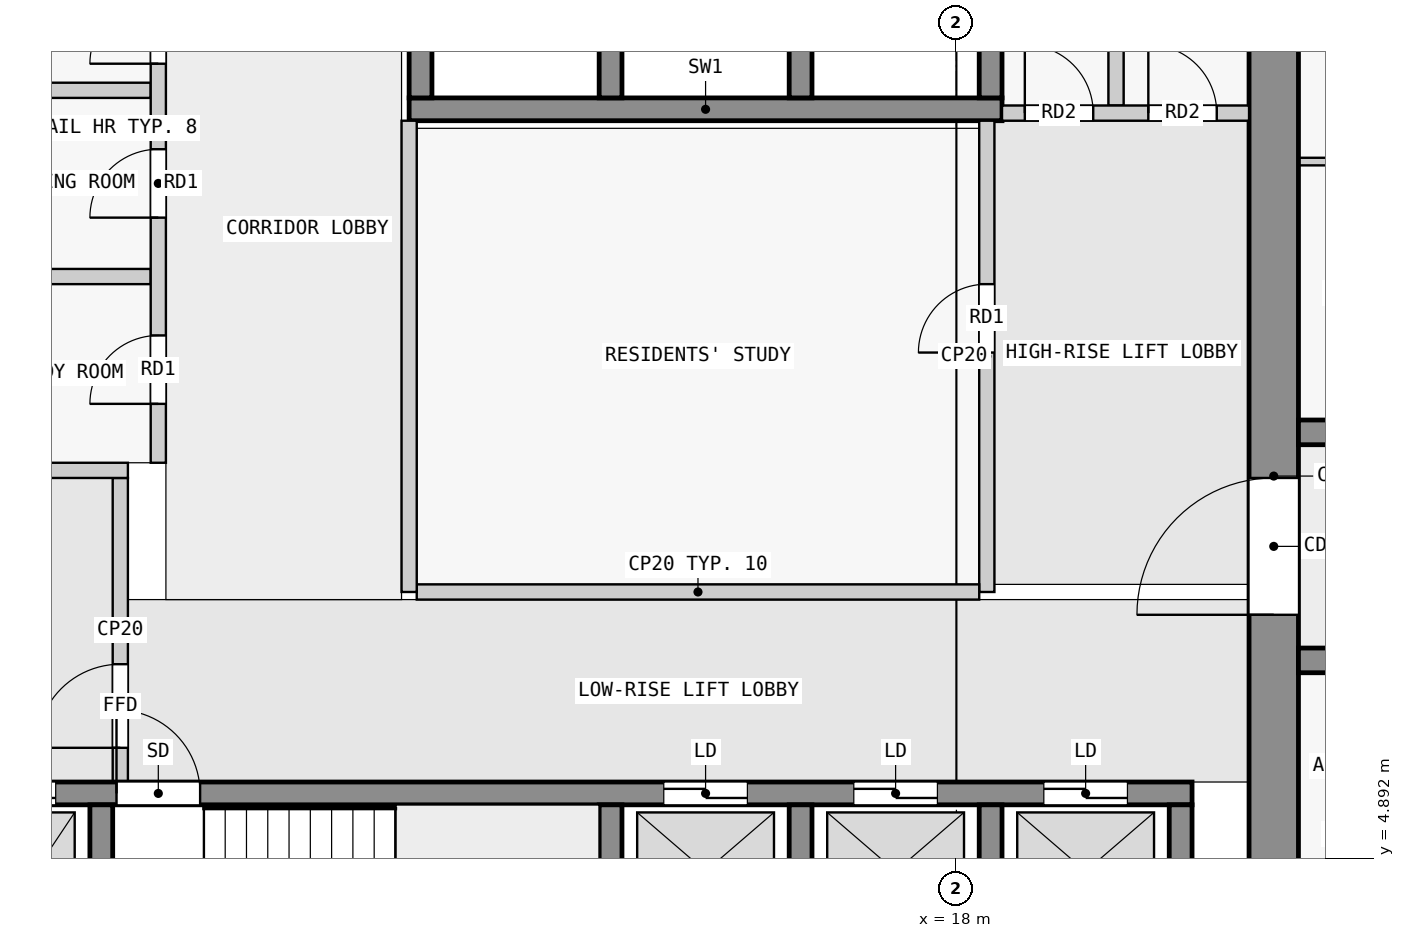
"""IFC4 building model, lengths in metres.
Left out: names, types, materials, properties, quantities, classifications, styles, units other than length and angle.
Written with IfcOpenShell. Run it as: python <this file> out.ifc"""

import sys

from ifc_helpers import new_model, si_unit, direction, frame, frame_2d, origin, place, context, subcontext, project, spatial, rectangle, extrude, element, fill, save


model = new_model("IFC4")
c1 = context("Model", 3, precision=1e-05, world=origin(), true_north=direction((0.0, 1.0)))
c2 = subcontext(c1, "Body", "Model", "MODEL_VIEW")
j1 = project(units=[si_unit("LENGTHUNIT", "METRE"), si_unit("PLANEANGLEUNIT", "RADIAN")], contexts=[c1])
p1 = place(None, origin())
s1 = spatial("IfcSite", under=j1, at=p1, CompositionType="ELEMENT")
p2 = place(p1, origin())
s2 = spatial("IfcBuilding", under=s1, at=p2, CompositionType="ELEMENT")
p3 = place(p2, frame((0.0, 0.0, 106.3)))
s3 = spatial("IfcBuildingStorey", under=s2, at=p3, CompositionType="ELEMENT", Elevation=106.3)
p4 = place(p3, frame((22.175, 2.5, 0.0), z_axis=(0.0, 0.0, 1.0), x_axis=(0.0, 1.0, 0.0)))
e1 = element("IfcWall", 1, at=p4, inside=s3, PredefinedType="SHEAR", context=c2, shape_type="SweptSolid", body=[
    extrude(rectangle(XDim=14.85, YDim=0.65, at=frame_2d((7.425, 0.0))), origin(), (0.0, 0.0, 1.0), 3.25),
])
p5 = place(p4, frame((5.6, 0.0, 0.0)))
e2 = element("IfcOpeningElement", 2, at=p5, cuts=e1, PredefinedType="OPENING", context=c2, shape_type="SweptSolid", body=[
    extrude(rectangle(XDim=1.8, YDim=2.1, at=frame_2d((0.9, 1.05))), frame((0.0, 0.335, 0.0), z_axis=(0.0, -1.0, 0.0), x_axis=(1.0, 0.0, 0.0)), (0.0, 0.0, 1.0), 0.67),
])
for number, where, z_axis, x_axis in (
    (3, (6.75, 2.8, 0.0), (0.0, 0.0, 1.0), (0.0, 1.0, 0.0)),
    (4, (13.45, 2.8, 0.0), (0.0, 0.0, 1.0), (0.0, 1.0, 0.0)),
    (5, (15.95, 2.8, 0.0), (0.0, 0.0, 1.0), (0.0, 1.0, 0.0)),
    (6, (18.45, 2.8, 0.0), (0.0, 0.0, 1.0), (0.0, 1.0, 0.0)),
    (7, (20.95, 2.8, 0.0), (0.0, 0.0, 1.0), (0.0, 1.0, 0.0)),
):
    element("IfcWall", number, at=place(p3, frame(where, z_axis=z_axis, x_axis=x_axis)), inside=s3, PredefinedType="SHEAR", context=c2, shape_type="SweptSolid", body=[
        extrude(rectangle(XDim=2.8, YDim=0.3, at=frame_2d((1.4, 0.0))), origin(), (0.0, 0.0, 1.0), 3.25),
    ])
p6 = place(p3, frame((2.3, 5.75, 0.0), z_axis=(0.0, 0.0, 1.0), x_axis=(1.0, 0.0, 0.0)))
e8 = element("IfcWall", 8, at=p6, inside=s3, PredefinedType="SHEAR", context=c2, shape_type="SweptSolid", body=[
    extrude(rectangle(XDim=18.8, YDim=0.3, at=frame_2d((9.4, 0.0))), origin(), (0.0, 0.0, 1.0), 3.25),
])
p7 = place(p6, frame((4.65, 0.0, 0.0)))
e9 = element("IfcOpeningElement", 9, at=p7, cuts=e8, PredefinedType="OPENING", context=c2, shape_type="SweptSolid", body=[
    extrude(rectangle(XDim=1.1, YDim=2.1, at=frame_2d((0.55, 1.05))), frame((0.0, 0.16, 0.0), z_axis=(0.0, -1.0, 0.0), x_axis=(1.0, 0.0, 0.0)), (0.0, 0.0, 1.0), 0.32),
])
p8 = place(p6, frame((0.45, 0.0, 0.0)))
e10 = element("IfcOpeningElement", 10, at=p8, cuts=e8, PredefinedType="OPENING", context=c2, shape_type="SweptSolid", body=[
    extrude(rectangle(XDim=1.1, YDim=2.1, at=frame_2d((0.55, 1.05))), frame((0.0, 0.16, 0.0), z_axis=(0.0, -1.0, 0.0), x_axis=(1.0, 0.0, 0.0)), (0.0, 0.0, 1.0), 0.32),
])
p9 = place(p6, frame((2.75, 0.0, 0.0)))
e11 = element("IfcOpeningElement", 11, at=p9, cuts=e8, PredefinedType="OPENING", context=c2, shape_type="SweptSolid", body=[
    extrude(rectangle(XDim=1.1, YDim=2.1, at=frame_2d((0.55, 1.05))), frame((0.0, 0.16, 0.0), z_axis=(0.0, -1.0, 0.0), x_axis=(1.0, 0.0, 0.0)), (0.0, 0.0, 1.0), 0.32),
])
p10 = place(p6, frame((11.85, 0.0, 0.0)))
e12 = element("IfcOpeningElement", 12, at=p10, cuts=e8, PredefinedType="OPENING", context=c2, shape_type="SweptSolid", body=[
    extrude(rectangle(XDim=1.1, YDim=2.1, at=frame_2d((0.55, 1.05))), frame((0.0, 0.16, 0.0), z_axis=(0.0, -1.0, 0.0), x_axis=(1.0, 0.0, 0.0)), (0.0, 0.0, 1.0), 0.32),
])
p11 = place(p6, frame((14.35, 0.0, 0.0)))
e13 = element("IfcOpeningElement", 13, at=p11, cuts=e8, PredefinedType="OPENING", context=c2, shape_type="SweptSolid", body=[
    extrude(rectangle(XDim=1.1, YDim=2.1, at=frame_2d((0.55, 1.05))), frame((0.0, 0.16, 0.0), z_axis=(0.0, -1.0, 0.0), x_axis=(1.0, 0.0, 0.0)), (0.0, 0.0, 1.0), 0.32),
])
p12 = place(p6, frame((16.85, 0.0, 0.0)))
e14 = element("IfcOpeningElement", 14, at=p12, cuts=e8, PredefinedType="OPENING", context=c2, shape_type="SweptSolid", body=[
    extrude(rectangle(XDim=1.1, YDim=2.1, at=frame_2d((0.55, 1.05))), frame((0.0, 0.16, 0.0), z_axis=(0.0, -1.0, 0.0), x_axis=(1.0, 0.0, 0.0)), (0.0, 0.0, 1.0), 0.32),
])
p13 = place(p3, frame((10.8, 14.75, 0.0), z_axis=(0.0, 0.0, 1.0), x_axis=(1.0, 0.0, 0.0)))
e15 = element("IfcWall", 15, at=p13, inside=s3, PredefinedType="SHEAR", context=c2, shape_type="SweptSolid", body=[
    extrude(rectangle(XDim=7.8, YDim=0.3, at=frame_2d((3.9, 0.0))), origin(), (0.0, 0.0, 1.0), 3.25),
])
for number, where, z_axis, x_axis in (
    (16, (10.95, 14.9, 0.0), (0.0, 0.0, 1.0), (0.0, 1.0, 0.0)),
    (17, (13.45, 14.9, 0.0), (0.0, 0.0, 1.0), (0.0, 1.0, 0.0)),
    (18, (15.95, 14.9, 0.0), (0.0, 0.0, 1.0), (0.0, 1.0, 0.0)),
    (19, (18.45, 14.9, 0.0), (0.0, 0.0, 1.0), (0.0, 1.0, 0.0)),
):
    element("IfcWall", number, at=place(p3, frame(where, z_axis=z_axis, x_axis=x_axis)), inside=s3, PredefinedType="SHEAR", context=c2, shape_type="SweptSolid", body=[
        extrude(rectangle(XDim=2.0, YDim=0.3, at=frame_2d((1.0, 0.0))), origin(), (0.0, 0.0, 1.0), 3.25),
    ])
p14 = place(p3, frame((22.5, 7.5, 0.0), z_axis=(0.0, 0.0, 1.0), x_axis=(1.0, 0.0, 0.0)))
e20 = element("IfcWall", 20, at=p14, inside=s3, PredefinedType="SHEAR", context=c2, shape_type="SweptSolid", body=[
    extrude(rectangle(XDim=22.5, YDim=0.325, at=frame_2d((11.25, 0.0))), origin(), (0.0, 0.0, 1.0), 3.25),
])
p15 = place(p14, frame((4.05, 0.0, 0.0)))
e21 = element("IfcOpeningElement", 21, at=p15, cuts=e20, PredefinedType="OPENING", context=c2, shape_type="SweptSolid", body=[
    extrude(rectangle(XDim=1.0, YDim=2.1, at=frame_2d((0.5, 1.05))), frame((0.0, 0.172, 0.0), z_axis=(0.0, -1.0, 0.0), x_axis=(1.0, 0.0, 0.0)), (0.0, 0.0, 1.0), 0.345),
])
p16 = place(p14, frame((10.75, 0.0, 0.0)))
e22 = element("IfcOpeningElement", 22, at=p16, cuts=e20, PredefinedType="OPENING", context=c2, shape_type="SweptSolid", body=[
    extrude(rectangle(XDim=1.0, YDim=2.1, at=frame_2d((0.5, 1.05))), frame((0.0, 0.172, 0.0), z_axis=(0.0, -1.0, 0.0), x_axis=(1.0, 0.0, 0.0)), (0.0, 0.0, 1.0), 0.345),
])
p17 = place(p14, frame((16.85, 0.0, 0.0)))
e23 = element("IfcOpeningElement", 23, at=p17, cuts=e20, PredefinedType="OPENING", context=c2, shape_type="SweptSolid", body=[
    extrude(rectangle(XDim=1.0, YDim=2.1, at=frame_2d((0.5, 1.05))), frame((0.0, 0.172, 0.0), z_axis=(0.0, -1.0, 0.0), x_axis=(1.0, 0.0, 0.0)), (0.0, 0.0, 1.0), 0.345),
])
p18 = place(p3, frame((22.5, 10.5, 0.0), z_axis=(0.0, 0.0, 1.0), x_axis=(1.0, 0.0, 0.0)))
e24 = element("IfcWall", 24, at=p18, inside=s3, PredefinedType="SHEAR", context=c2, shape_type="SweptSolid", body=[
    extrude(rectangle(XDim=22.5, YDim=0.325, at=frame_2d((11.25, 0.0))), origin(), (0.0, 0.0, 1.0), 3.25),
])
p19 = place(p18, frame((1.75, 0.0, 0.0)))
e25 = element("IfcOpeningElement", 25, at=p19, cuts=e24, PredefinedType="OPENING", context=c2, shape_type="SweptSolid", body=[
    extrude(rectangle(XDim=1.0, YDim=2.1, at=frame_2d((0.5, 1.05))), frame((0.0, 0.172, 0.0), z_axis=(0.0, -1.0, 0.0), x_axis=(1.0, 0.0, 0.0)), (0.0, 0.0, 1.0), 0.345),
])
p20 = place(p18, frame((6.25, 0.0, 0.0)))
e26 = element("IfcOpeningElement", 26, at=p20, cuts=e24, PredefinedType="OPENING", context=c2, shape_type="SweptSolid", body=[
    extrude(rectangle(XDim=1.0, YDim=2.1, at=frame_2d((0.5, 1.05))), frame((0.0, 0.172, 0.0), z_axis=(0.0, -1.0, 0.0), x_axis=(1.0, 0.0, 0.0)), (0.0, 0.0, 1.0), 0.345),
])
p21 = place(p18, frame((10.85, 0.0, 0.0)))
e27 = element("IfcOpeningElement", 27, at=p21, cuts=e24, PredefinedType="OPENING", context=c2, shape_type="SweptSolid", body=[
    extrude(rectangle(XDim=0.9, YDim=2.1, at=frame_2d((0.45, 1.05))), frame((0.0, 0.172, 0.0), z_axis=(0.0, -1.0, 0.0), x_axis=(1.0, 0.0, 0.0)), (0.0, 0.0, 1.0), 0.345),
])
p22 = place(p18, frame((15.25, 0.0, 0.0)))
e28 = element("IfcOpeningElement", 28, at=p22, cuts=e24, PredefinedType="OPENING", context=c2, shape_type="SweptSolid", body=[
    extrude(rectangle(XDim=1.0, YDim=2.1, at=frame_2d((0.5, 1.05))), frame((0.0, 0.172, 0.0), z_axis=(0.0, -1.0, 0.0), x_axis=(1.0, 0.0, 0.0)), (0.0, 0.0, 1.0), 0.345),
])
p23 = place(p18, frame((18.75, 0.0, 0.0)))
e29 = element("IfcOpeningElement", 29, at=p23, cuts=e24, PredefinedType="OPENING", context=c2, shape_type="SweptSolid", body=[
    extrude(rectangle(XDim=0.9, YDim=2.1, at=frame_2d((0.45, 1.05))), frame((0.0, 0.172, 0.0), z_axis=(0.0, -1.0, 0.0), x_axis=(1.0, 0.0, 0.0)), (0.0, 0.0, 1.0), 0.345),
])
p24 = place(p18, frame((20.95, 0.0, 0.0)))
e30 = element("IfcOpeningElement", 30, at=p24, cuts=e24, PredefinedType="OPENING", context=c2, shape_type="SweptSolid", body=[
    extrude(rectangle(XDim=1.0, YDim=2.1, at=frame_2d((0.5, 1.05))), frame((0.0, 0.172, 0.0), z_axis=(0.0, -1.0, 0.0), x_axis=(1.0, 0.0, 0.0)), (0.0, 0.0, 1.0), 0.345),
])
p25 = place(p3, frame((7.0, 5.9, 0.0), z_axis=(0.0, 0.0, 1.0), x_axis=(0.0, 1.0, 0.0)))
e31 = element("IfcWall", 31, at=p25, inside=s3, PredefinedType="PARTITIONING", context=c2, shape_type="SweptSolid", body=[
    extrude(rectangle(XDim=4.0, YDim=0.2, at=frame_2d((2.0, 0.0))), origin(), (0.0, 0.0, 1.0), 3.25),
])
p26 = place(p25, frame((0.45, 0.0, 0.0)))
e32 = element("IfcOpeningElement", 32, at=p26, cuts=e31, PredefinedType="OPENING", context=c2, shape_type="SweptSolid", body=[
    extrude(rectangle(XDim=1.1, YDim=2.1, at=frame_2d((0.55, 1.05))), frame((0.0, 0.11, 0.0), z_axis=(0.0, -1.0, 0.0), x_axis=(1.0, 0.0, 0.0)), (0.0, 0.0, 1.0), 0.22),
])
p27 = place(p3, frame((5.15, 10.0, 0.0), z_axis=(0.0, 0.0, 1.0), x_axis=(1.0, 0.0, 0.0)))
e33 = element("IfcWall", 33, at=p27, inside=s3, PredefinedType="PARTITIONING", context=c2, shape_type="SweptSolid", body=[
    extrude(rectangle(XDim=1.95, YDim=0.2, at=frame_2d((0.975, 0.0))), origin(), (0.0, 0.0, 1.0), 3.25),
])
p28 = place(p3, frame((10.8, 8.4, 0.0), z_axis=(0.0, 0.0, 1.0), x_axis=(0.0, 1.0, 0.0)))
e34 = element("IfcWall", 34, at=p28, inside=s3, PredefinedType="PARTITIONING", context=c2, shape_type="SweptSolid", body=[
    extrude(rectangle(XDim=6.2, YDim=0.2, at=frame_2d((3.1, 0.0))), origin(), (0.0, 0.0, 1.0), 3.25),
])
p29 = place(p3, frame((10.9, 8.4, 0.0), z_axis=(0.0, 0.0, 1.0), x_axis=(1.0, 0.0, 0.0)))
e35 = element("IfcWall", 35, at=p29, inside=s3, PredefinedType="PARTITIONING", context=c2, shape_type="SweptSolid", body=[
    extrude(rectangle(XDim=7.4, YDim=0.2, at=frame_2d((3.7, 0.0))), origin(), (0.0, 0.0, 1.0), 3.25),
])
p30 = place(p3, frame((18.4, 8.4, 0.0), z_axis=(0.0, 0.0, 1.0), x_axis=(0.0, 1.0, 0.0)))
e36 = element("IfcWall", 36, at=p30, inside=s3, PredefinedType="PARTITIONING", context=c2, shape_type="SweptSolid", body=[
    extrude(rectangle(XDim=6.2, YDim=0.2, at=frame_2d((3.1, 0.0))), origin(), (0.0, 0.0, 1.0), 3.25),
])
p31 = place(p30, frame((3.15, 0.0, 0.0)))
e37 = element("IfcOpeningElement", 37, at=p31, cuts=e36, PredefinedType="OPENING", context=c2, shape_type="SweptSolid", body=[
    extrude(rectangle(XDim=0.9, YDim=2.1, at=frame_2d((0.45, 1.05))), frame((0.0, 0.11, 0.0), z_axis=(0.0, -1.0, 0.0), x_axis=(1.0, 0.0, 0.0)), (0.0, 0.0, 1.0), 0.22),
])
p32 = place(p3, frame((7.5, 10.1, 0.0), z_axis=(0.0, 0.0, 1.0), x_axis=(0.0, 1.0, 0.0)))
e38 = element("IfcWall", 38, at=p32, inside=s3, PredefinedType="PARTITIONING", context=c2, shape_type="SweptSolid", body=[
    extrude(rectangle(XDim=7.25, YDim=0.2, at=frame_2d((3.625, 0.0))), origin(), (0.0, 0.0, 1.0), 3.25),
])
p33 = place(p32, frame((0.775, 0.0, 0.0)))
e39 = element("IfcOpeningElement", 39, at=p33, cuts=e38, PredefinedType="OPENING", context=c2, shape_type="SweptSolid", body=[
    extrude(rectangle(XDim=0.9, YDim=2.1, at=frame_2d((0.45, 1.05))), frame((0.0, 0.11, 0.0), z_axis=(0.0, -1.0, 0.0), x_axis=(1.0, 0.0, 0.0)), (0.0, 0.0, 1.0), 0.22),
])
p34 = place(p32, frame((3.225, 0.0, 0.0)))
e40 = element("IfcOpeningElement", 40, at=p34, cuts=e38, PredefinedType="OPENING", context=c2, shape_type="SweptSolid", body=[
    extrude(rectangle(XDim=0.9, YDim=2.1, at=frame_2d((0.45, 1.05))), frame((0.0, 0.11, 0.0), z_axis=(0.0, -1.0, 0.0), x_axis=(1.0, 0.0, 0.0)), (0.0, 0.0, 1.0), 0.22),
])
p35 = place(p32, frame((5.25, 0.0, 0.0)))
e41 = element("IfcOpeningElement", 41, at=p35, cuts=e38, PredefinedType="OPENING", context=c2, shape_type="SweptSolid", body=[
    extrude(rectangle(XDim=0.9, YDim=2.1, at=frame_2d((0.45, 1.05))), frame((0.0, 0.11, 0.0), z_axis=(0.0, -1.0, 0.0), x_axis=(1.0, 0.0, 0.0)), (0.0, 0.0, 1.0), 0.22),
])
for number, where, z_axis, x_axis in (
    (42, (5.15, 12.55, 0.0), (0.0, 0.0, 1.0), (1.0, 0.0, 0.0)),
    (43, (5.15, 15.0, 0.0), (0.0, 0.0, 1.0), (1.0, 0.0, 0.0)),
):
    element("IfcWall", number, at=place(p3, frame(where, z_axis=z_axis, x_axis=x_axis)), inside=s3, PredefinedType="PARTITIONING", context=c2, shape_type="SweptSolid", body=[
        extrude(rectangle(XDim=2.25, YDim=0.2, at=frame_2d((1.125, 0.0))), origin(), (0.0, 0.0, 1.0), 3.25),
    ])
p36 = place(p3, frame((18.6, 14.7, 0.0), z_axis=(0.0, 0.0, 1.0), x_axis=(1.0, 0.0, 0.0)))
e44 = element("IfcWall", 44, at=p36, inside=s3, PredefinedType="PARTITIONING", context=c2, shape_type="SweptSolid", body=[
    extrude(rectangle(XDim=3.25, YDim=0.2, at=frame_2d((1.625, 0.0))), origin(), (0.0, 0.0, 1.0), 3.25),
])
p37 = place(p36, frame((0.3, 0.0, 0.0)))
e45 = element("IfcOpeningElement", 45, at=p37, cuts=e44, PredefinedType="OPENING", context=c2, shape_type="SweptSolid", body=[
    extrude(rectangle(XDim=0.9, YDim=2.1, at=frame_2d((0.45, 1.05))), frame((0.0, 0.11, 0.0), z_axis=(0.0, -1.0, 0.0), x_axis=(1.0, 0.0, 0.0)), (0.0, 0.0, 1.0), 0.22),
])
p38 = place(p36, frame((1.925, 0.0, 0.0)))
e46 = element("IfcOpeningElement", 46, at=p38, cuts=e44, PredefinedType="OPENING", context=c2, shape_type="SweptSolid", body=[
    extrude(rectangle(XDim=0.9, YDim=2.1, at=frame_2d((0.45, 1.05))), frame((0.0, 0.11, 0.0), z_axis=(0.0, -1.0, 0.0), x_axis=(1.0, 0.0, 0.0)), (0.0, 0.0, 1.0), 0.22),
])
p39 = place(p3, frame((20.1, 14.8, 0.0), z_axis=(0.0, 0.0, 1.0), x_axis=(0.0, 1.0, 0.0)))
e47 = element("IfcWall", 47, at=p39, inside=s3, PredefinedType="PARTITIONING", context=c2, shape_type="SweptSolid", body=[
    extrude(rectangle(XDim=2.55, YDim=0.2, at=frame_2d((1.275, 0.0))), origin(), (0.0, 0.0, 1.0), 3.25),
])
p40 = place(p3, frame((23.95, 14.062, 0.0), z_axis=(0.0, 0.0, 1.0), x_axis=(-1.0, 0.0, 0.0)))
e48 = element("IfcWall", 48, at=p40, inside=s3, PredefinedType="PARTITIONING", context=c2, shape_type="SweptSolid", body=[
    extrude(rectangle(XDim=1.45, YDim=0.1, at=frame_2d((0.725, 0.0))), origin(), (0.0, 0.0, 1.0), 3.25),
])
p41 = place(p26, origin())
e49 = element("IfcDoor", 49, at=p41, inside=s3, OperationType="SINGLE_SWING_LEFT", PredefinedType="DOOR", context=c2, shape_type="SweptSolid", body=[
    extrude(rectangle(XDim=1.1, YDim=2.1, at=frame_2d((0.55, 1.05))), frame((0.0, 0.025, 0.0), z_axis=(0.0, -1.0, 0.0), x_axis=(1.0, 0.0, 0.0)), (0.0, 0.0, 1.0), 0.05),
])
fill(e32, e49)
p42 = place(p31, origin())
e50 = element("IfcDoor", 50, at=p42, inside=s3, OperationType="SINGLE_SWING_LEFT", PredefinedType="DOOR", context=c2, shape_type="SweptSolid", body=[
    extrude(rectangle(XDim=0.9, YDim=2.1, at=frame_2d((0.45, 1.05))), frame((0.0, 0.025, 0.0), z_axis=(0.0, -1.0, 0.0), x_axis=(1.0, 0.0, 0.0)), (0.0, 0.0, 1.0), 0.05),
])
fill(e37, e50)
p43 = place(p7, origin())
e51 = element("IfcDoor", 51, at=p43, inside=s3, OperationType="SINGLE_SWING_LEFT", PredefinedType="DOOR", context=c2, shape_type="SweptSolid", body=[
    extrude(rectangle(XDim=1.1, YDim=2.1, at=frame_2d((0.55, 1.05))), frame((0.0, 0.025, 0.0), z_axis=(0.0, -1.0, 0.0), x_axis=(1.0, 0.0, 0.0)), (0.0, 0.0, 1.0), 0.05),
])
fill(e9, e51)
p44 = place(p9, origin())
e52 = element("IfcDoor", 52, at=p44, inside=s3, OperationType="DOUBLE_DOOR_SLIDING", PredefinedType="DOOR", context=c2, shape_type="SweptSolid", body=[
    extrude(rectangle(XDim=1.1, YDim=2.1, at=frame_2d((0.55, 1.05))), frame((0.0, 0.025, 0.0), z_axis=(0.0, -1.0, 0.0), x_axis=(1.0, 0.0, 0.0)), (0.0, 0.0, 1.0), 0.05),
])
fill(e11, e52)
p45 = place(p10, origin())
e53 = element("IfcDoor", 53, at=p45, inside=s3, OperationType="DOUBLE_DOOR_SLIDING", PredefinedType="DOOR", context=c2, shape_type="SweptSolid", body=[
    extrude(rectangle(XDim=1.1, YDim=2.1, at=frame_2d((0.55, 1.05))), frame((0.0, 0.025, 0.0), z_axis=(0.0, -1.0, 0.0), x_axis=(1.0, 0.0, 0.0)), (0.0, 0.0, 1.0), 0.05),
])
fill(e12, e53)
p46 = place(p11, origin())
e54 = element("IfcDoor", 54, at=p46, inside=s3, OperationType="DOUBLE_DOOR_SLIDING", PredefinedType="DOOR", context=c2, shape_type="SweptSolid", body=[
    extrude(rectangle(XDim=1.1, YDim=2.1, at=frame_2d((0.55, 1.05))), frame((0.0, 0.025, 0.0), z_axis=(0.0, -1.0, 0.0), x_axis=(1.0, 0.0, 0.0)), (0.0, 0.0, 1.0), 0.05),
])
fill(e13, e54)
p47 = place(p12, origin())
e55 = element("IfcDoor", 55, at=p47, inside=s3, OperationType="DOUBLE_DOOR_SLIDING", PredefinedType="DOOR", context=c2, shape_type="SweptSolid", body=[
    extrude(rectangle(XDim=1.1, YDim=2.1, at=frame_2d((0.55, 1.05))), frame((0.0, 0.025, 0.0), z_axis=(0.0, -1.0, 0.0), x_axis=(1.0, 0.0, 0.0)), (0.0, 0.0, 1.0), 0.05),
])
fill(e14, e55)
p48 = place(p5, origin())
e56 = element("IfcDoor", 56, at=p48, inside=s3, OperationType="DOUBLE_DOOR_SINGLE_SWING", PredefinedType="DOOR", context=c2, shape_type="SweptSolid", body=[
    extrude(rectangle(XDim=1.8, YDim=2.1, at=frame_2d((0.9, 1.05))), frame((0.0, 0.025, 0.0), z_axis=(0.0, -1.0, 0.0), x_axis=(1.0, 0.0, 0.0)), (0.0, 0.0, 1.0), 0.05),
])
fill(e2, e56)
p49 = place(p33, origin())
e57 = element("IfcDoor", 57, at=p49, inside=s3, OperationType="SINGLE_SWING_RIGHT", PredefinedType="DOOR", context=c2, shape_type="SweptSolid", body=[
    extrude(rectangle(XDim=0.9, YDim=2.1, at=frame_2d((0.45, 1.05))), frame((0.0, 0.025, 0.0), z_axis=(0.0, -1.0, 0.0), x_axis=(1.0, 0.0, 0.0)), (0.0, 0.0, 1.0), 0.05),
])
fill(e39, e57)
p50 = place(p34, origin())
e58 = element("IfcDoor", 58, at=p50, inside=s3, OperationType="SINGLE_SWING_RIGHT", PredefinedType="DOOR", context=c2, shape_type="SweptSolid", body=[
    extrude(rectangle(XDim=0.9, YDim=2.1, at=frame_2d((0.45, 1.05))), frame((0.0, 0.025, 0.0), z_axis=(0.0, -1.0, 0.0), x_axis=(1.0, 0.0, 0.0)), (0.0, 0.0, 1.0), 0.05),
])
fill(e40, e58)
p51 = place(p35, origin())
e59 = element("IfcDoor", 59, at=p51, inside=s3, OperationType="SINGLE_SWING_RIGHT", PredefinedType="DOOR", context=c2, shape_type="SweptSolid", body=[
    extrude(rectangle(XDim=0.9, YDim=2.1, at=frame_2d((0.45, 1.05))), frame((0.0, 0.025, 0.0), z_axis=(0.0, -1.0, 0.0), x_axis=(1.0, 0.0, 0.0)), (0.0, 0.0, 1.0), 0.05),
])
fill(e41, e59)
p52 = place(p37, origin())
e60 = element("IfcDoor", 60, at=p52, inside=s3, OperationType="SINGLE_SWING_LEFT", PredefinedType="DOOR", context=c2, shape_type="SweptSolid", body=[
    extrude(rectangle(XDim=0.9, YDim=2.1, at=frame_2d((0.45, 1.05))), frame((0.0, 0.025, 0.0), z_axis=(0.0, -1.0, 0.0), x_axis=(1.0, 0.0, 0.0)), (0.0, 0.0, 1.0), 0.05),
])
fill(e45, e60)
p53 = place(p38, origin())
e61 = element("IfcDoor", 61, at=p53, inside=s3, OperationType="SINGLE_SWING_LEFT", PredefinedType="DOOR", context=c2, shape_type="SweptSolid", body=[
    extrude(rectangle(XDim=0.9, YDim=2.1, at=frame_2d((0.45, 1.05))), frame((0.0, 0.025, 0.0), z_axis=(0.0, -1.0, 0.0), x_axis=(1.0, 0.0, 0.0)), (0.0, 0.0, 1.0), 0.05),
])
fill(e46, e61)
save(model, sys.argv[1])
